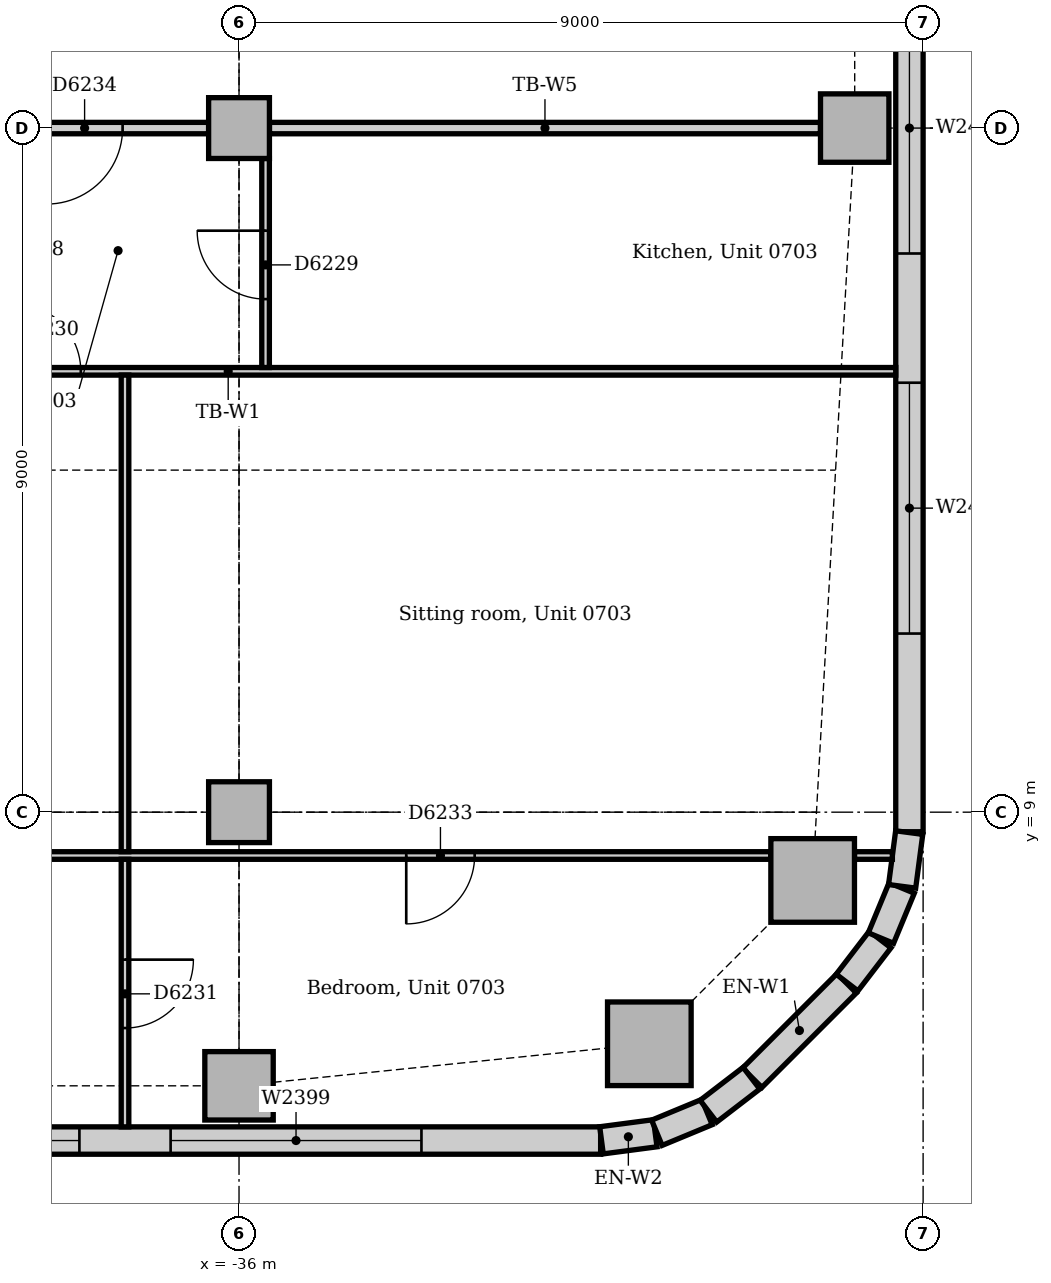
"""IFC4 building model, lengths in metres.
Left out: names, types, materials, properties, quantities, classifications, styles, units other than length and angle.
Written with IfcOpenShell. Run it as: python <this file> out.ifc"""

import sys

from ifc_helpers import new_model, si_unit, direction, frame, frame_2d, origin, origin_2d, place, context, subcontext, project, spatial, rectangle, extrude, element, fill, save


model = new_model("IFC4")
c1 = context("Model", 3, precision=1e-05, world=origin(), true_north=direction((0.0, 1.0)))
c2 = subcontext(c1, "Body", "Model", "MODEL_VIEW")
j1 = project(units=[si_unit("LENGTHUNIT", "METRE"), si_unit("PLANEANGLEUNIT", "RADIAN")], contexts=[c1])
p1 = place(None, origin())
s1 = spatial("IfcSite", under=j1, at=p1, CompositionType="ELEMENT")
p2 = place(p1, origin())
s2 = spatial("IfcBuilding", under=s1, at=p2, CompositionType="ELEMENT")
p3 = place(p2, frame((0.0, 0.0, 34.0)))
s3 = spatial("IfcBuildingStorey", under=s2, at=p3, CompositionType="ELEMENT", Elevation=34.0)
for number, where, z_axis, x_axis in (
    (1, (-30.602, 5.953, 0.0), (0.0, 0.0, 1.0), (1.0, 0.0, 0.0)),
    (2, (-28.453, 8.102, 0.0), (0.0, 0.0, 1.0), (1.0, 0.0, 0.0)),
):
    element("IfcColumn", number, at=place(p3, frame(where, z_axis=z_axis, x_axis=x_axis)), inside=s3, PredefinedType="COLUMN", context=c2, shape_type="SweptSolid", body=[
        extrude(rectangle(XDim=1.1, YDim=1.1, at=origin_2d()), origin(), (0.0, 0.0, 1.0), 3.85),
    ])
for number, where, z_axis, x_axis in (
    (3, (-36.0, 5.4, 0.0), (0.0, 0.0, 1.0), (1.0, 0.0, 0.0)),
    (4, (-27.9, 18.0, 0.0), (0.0, 0.0, 1.0), (1.0, 0.0, 0.0)),
):
    element("IfcColumn", number, at=place(p3, frame(where, z_axis=z_axis, x_axis=x_axis)), inside=s3, PredefinedType="COLUMN", context=c2, shape_type="SweptSolid", body=[
        extrude(rectangle(XDim=0.9, YDim=0.9, at=origin_2d()), origin(), (0.0, 0.0, 1.0), 3.85),
    ])
for number, where, z_axis, x_axis in (
    (5, (-36.0, 9.0, 0.0), (0.0, 0.0, 1.0), (1.0, 0.0, 0.0)),
    (6, (-36.0, 18.0, 0.0), (0.0, 0.0, 1.0), (1.0, 0.0, 0.0)),
):
    element("IfcColumn", number, at=place(p3, frame(where, z_axis=z_axis, x_axis=x_axis)), inside=s3, PredefinedType="COLUMN", context=c2, shape_type="SweptSolid", body=[
        extrude(rectangle(XDim=0.8, YDim=0.8, at=origin_2d()), origin(), (0.0, 0.0, 1.0), 3.85),
    ])
p4 = place(p3, frame((-61.757, 4.68, 0.0), z_axis=(0.0, 0.0, 1.0), x_axis=(1.0, 0.0, 0.0)))
e7 = element("IfcWall", 7, at=p4, inside=s3, PredefinedType="STANDARD", context=c2, shape_type="SweptSolid", body=[
    extrude(rectangle(XDim=30.515, YDim=0.36, at=frame_2d((15.257, 0.0))), origin(), (0.0, 0.0, 1.0), 3.85),
])
p5 = place(p4, frame((2.357, 0.0, 0.9)))
e8 = element("IfcOpeningElement", 8, at=p5, cuts=e7, PredefinedType="OPENING", context=c2, shape_type="SweptSolid", body=[
    extrude(rectangle(XDim=3.3, YDim=1.6, at=frame_2d((1.65, 0.8))), frame((0.0, 0.19, 0.0), z_axis=(0.0, -1.0, 0.0), x_axis=(1.0, 0.0, 0.0)), (0.0, 0.0, 1.0), 0.38),
])
p6 = place(p4, frame((6.857, 0.0, 0.9)))
e9 = element("IfcOpeningElement", 9, at=p6, cuts=e7, PredefinedType="OPENING", context=c2, shape_type="SweptSolid", body=[
    extrude(rectangle(XDim=3.3, YDim=1.6, at=frame_2d((1.65, 0.8))), frame((0.0, 0.19, 0.0), z_axis=(0.0, -1.0, 0.0), x_axis=(1.0, 0.0, 0.0)), (0.0, 0.0, 1.0), 0.38),
])
p7 = place(p4, frame((11.357, 0.0, 0.9)))
e10 = element("IfcOpeningElement", 10, at=p7, cuts=e7, PredefinedType="OPENING", context=c2, shape_type="SweptSolid", body=[
    extrude(rectangle(XDim=3.3, YDim=1.6, at=frame_2d((1.65, 0.8))), frame((0.0, 0.19, 0.0), z_axis=(0.0, -1.0, 0.0), x_axis=(1.0, 0.0, 0.0)), (0.0, 0.0, 1.0), 0.38),
])
p8 = place(p4, frame((15.857, 0.0, 0.9)))
e11 = element("IfcOpeningElement", 11, at=p8, cuts=e7, PredefinedType="OPENING", context=c2, shape_type="SweptSolid", body=[
    extrude(rectangle(XDim=3.3, YDim=1.6, at=frame_2d((1.65, 0.8))), frame((0.0, 0.19, 0.0), z_axis=(0.0, -1.0, 0.0), x_axis=(1.0, 0.0, 0.0)), (0.0, 0.0, 1.0), 0.38),
])
p9 = place(p4, frame((20.357, 0.0, 0.9)))
e12 = element("IfcOpeningElement", 12, at=p9, cuts=e7, PredefinedType="OPENING", context=c2, shape_type="SweptSolid", body=[
    extrude(rectangle(XDim=3.3, YDim=1.6, at=frame_2d((1.65, 0.8))), frame((0.0, 0.19, 0.0), z_axis=(0.0, -1.0, 0.0), x_axis=(1.0, 0.0, 0.0)), (0.0, 0.0, 1.0), 0.38),
])
p10 = place(p4, frame((24.857, 0.0, 0.9)))
e13 = element("IfcOpeningElement", 13, at=p10, cuts=e7, PredefinedType="OPENING", context=c2, shape_type="SweptSolid", body=[
    extrude(rectangle(XDim=3.3, YDim=1.6, at=frame_2d((1.65, 0.8))), frame((0.0, 0.19, 0.0), z_axis=(0.0, -1.0, 0.0), x_axis=(1.0, 0.0, 0.0)), (0.0, 0.0, 1.0), 0.38),
])
p11 = place(p3, frame((-29.249, 5.506, 0.0), z_axis=(0.0, 0.0, 1.0), x_axis=(0.707106781187, 0.707106781187, 0.0)))
e14 = element("IfcWall", 14, at=p11, inside=s3, PredefinedType="STANDARD", context=c2, shape_type="SweptSolid", body=[
    extrude(rectangle(XDim=1.757, YDim=0.36, at=frame_2d((0.879, 0.0))), origin(), (0.0, 0.0, 1.0), 3.85),
])
p12 = place(p3, frame((-27.18, 8.743, 0.0), z_axis=(0.0, 0.0, 1.0), x_axis=(0.0, 1.0, 0.0)))
e15 = element("IfcWall", 15, at=p12, inside=s3, PredefinedType="STANDARD", context=c2, shape_type="SweptSolid", body=[
    extrude(rectangle(XDim=12.257, YDim=0.36, at=frame_2d((6.129, 0.0))), origin(), (0.0, 0.0, 1.0), 3.85),
])
p13 = place(p12, frame((2.607, 0.0, 0.9)))
e16 = element("IfcOpeningElement", 16, at=p13, cuts=e15, PredefinedType="OPENING", context=c2, shape_type="SweptSolid", body=[
    extrude(rectangle(XDim=3.3, YDim=1.6, at=frame_2d((1.65, 0.8))), frame((0.0, 0.19, 0.0), z_axis=(0.0, -1.0, 0.0), x_axis=(1.0, 0.0, 0.0)), (0.0, 0.0, 1.0), 0.38),
])
p14 = place(p12, frame((7.607, 0.0, 0.9)))
e17 = element("IfcOpeningElement", 17, at=p14, cuts=e15, PredefinedType="OPENING", context=c2, shape_type="SweptSolid", body=[
    extrude(rectangle(XDim=3.3, YDim=1.6, at=frame_2d((1.65, 0.8))), frame((0.0, 0.19, 0.0), z_axis=(0.0, -1.0, 0.0), x_axis=(1.0, 0.0, 0.0)), (0.0, 0.0, 1.0), 0.38),
])
for number, where, z_axis, x_axis in (
    (18, (-31.231, 4.683, 0.0), (0.0, 0.0, 1.0), (0.991, 0.131, 0.0)),
    (19, (-30.503, 4.782, 0.0), (0.0, 0.0, 1.0), (0.924, 0.383, 0.0)),
):
    element("IfcWall", number, at=place(p3, frame(where, z_axis=z_axis, x_axis=x_axis)), inside=s3, PredefinedType="STANDARD", context=c2, shape_type="SweptSolid", body=[
        extrude(rectangle(XDim=0.713, YDim=0.36, at=frame_2d((0.356, 0.0))), origin(), (0.0, 0.0, 1.0), 3.85),
    ])
for number, where, z_axis, x_axis in (
    (20, (-29.825, 5.066, 0.0), (0.0, 0.0, 1.0), (0.793, 0.609, 0.0)),
    (21, (-28.0, 6.759, 0.0), (0.0, 0.0, 1.0), (0.609, 0.793, 0.0)),
):
    element("IfcWall", number, at=place(p3, frame(where, z_axis=z_axis, x_axis=x_axis)), inside=s3, PredefinedType="STANDARD", context=c2, shape_type="SweptSolid", body=[
        extrude(rectangle(XDim=0.713, YDim=0.36, at=frame_2d((0.357, 0.0))), origin(), (0.0, 0.0, 1.0), 3.85),
    ])
for number, where, z_axis, x_axis in (
    (22, (-27.555, 7.344, 0.0), (0.0, 0.0, 1.0), (0.383, 0.924, 0.0)),
    (23, (-27.276, 8.024, 0.0), (0.0, 0.0, 1.0), (0.131, 0.991, 0.0)),
):
    element("IfcWall", number, at=place(p3, frame(where, z_axis=z_axis, x_axis=x_axis)), inside=s3, PredefinedType="STANDARD", context=c2, shape_type="SweptSolid", body=[
        extrude(rectangle(XDim=0.713, YDim=0.36, at=frame_2d((0.356, 0.0))), origin(), (0.0, 0.0, 1.0), 3.85),
    ])
p15 = place(p3, frame((-35.6, 18.0, 0.0), z_axis=(0.0, 0.0, 1.0), x_axis=(1.0, 0.0, 0.0)))
e24 = element("IfcWall", 24, at=p15, inside=s3, PredefinedType="PARTITIONING", context=c2, shape_type="SweptSolid", body=[
    extrude(rectangle(XDim=7.25, YDim=0.15, at=frame_2d((3.625, 0.0))), origin(), (0.0, 0.0, 1.0), 3.15),
])
p16 = place(p3, frame((-44.6, 18.0, 0.0), z_axis=(0.0, 0.0, 1.0), x_axis=(1.0, 0.0, 0.0)))
e25 = element("IfcWall", 25, at=p16, inside=s3, PredefinedType="PARTITIONING", context=c2, shape_type="SweptSolid", body=[
    extrude(rectangle(XDim=8.2, YDim=0.15, at=frame_2d((4.1, 0.0))), origin(), (0.0, 0.0, 1.0), 3.15),
])
p17 = place(p16, frame((6.068, 0.0, 0.0)))
e26 = element("IfcOpeningElement", 26, at=p17, cuts=e25, PredefinedType="OPENING", context=c2, shape_type="SweptSolid", body=[
    extrude(rectangle(XDim=1.0, YDim=2.1, at=frame_2d((0.5, 1.05))), frame((0.0, 0.085, 0.0), z_axis=(0.0, -1.0, 0.0), x_axis=(1.0, 0.0, 0.0)), (0.0, 0.0, 1.0), 0.17),
])
p18 = place(p3, frame((-44.925, 14.8, 0.0), z_axis=(0.0, 0.0, 1.0), x_axis=(1.0, 0.0, 0.0)))
e27 = element("IfcWall", 27, at=p18, inside=s3, PredefinedType="PARTITIONING", context=c2, shape_type="SweptSolid", body=[
    extrude(rectangle(XDim=17.565, YDim=0.1, at=frame_2d((8.783, 0.0))), origin(), (0.0, 0.0, 1.0), 3.85),
])
p19 = place(p18, frame((5.943, 0.0, 0.0)))
e28 = element("IfcOpeningElement", 28, at=p19, cuts=e27, PredefinedType="OPENING", context=c2, shape_type="SweptSolid", body=[
    extrude(rectangle(XDim=0.9, YDim=2.1, at=frame_2d((0.45, 1.05))), frame((0.0, 0.06, 0.0), z_axis=(0.0, -1.0, 0.0), x_axis=(1.0, 0.0, 0.0)), (0.0, 0.0, 1.0), 0.12),
])
p20 = place(p3, frame((-44.925, 8.43, 0.0), z_axis=(0.0, 0.0, 1.0), x_axis=(1.0, 0.0, 0.0)))
e29 = element("IfcWall", 29, at=p20, inside=s3, PredefinedType="PARTITIONING", context=c2, shape_type="SweptSolid", body=[
    extrude(rectangle(XDim=15.922, YDim=0.1, at=frame_2d((7.961, 0.0))), origin(), (0.0, 0.0, 1.0), 3.85),
])
p21 = place(p20, frame((3.35, 0.0, 0.0)))
e30 = element("IfcOpeningElement", 30, at=p21, cuts=e29, PredefinedType="OPENING", context=c2, shape_type="SweptSolid", body=[
    extrude(rectangle(XDim=0.9, YDim=2.1, at=frame_2d((0.45, 1.05))), frame((0.0, 0.06, 0.0), z_axis=(0.0, -1.0, 0.0), x_axis=(1.0, 0.0, 0.0)), (0.0, 0.0, 1.0), 0.12),
])
p22 = place(p20, frame((11.125, 0.0, 0.0)))
e31 = element("IfcOpeningElement", 31, at=p22, cuts=e29, PredefinedType="OPENING", context=c2, shape_type="SweptSolid", body=[
    extrude(rectangle(XDim=0.9, YDim=2.1, at=frame_2d((0.45, 1.05))), frame((0.0, 0.06, 0.0), z_axis=(0.0, -1.0, 0.0), x_axis=(1.0, 0.0, 0.0)), (0.0, 0.0, 1.0), 0.12),
])
p23 = place(p3, frame((-27.903, 8.43, 0.0), z_axis=(0.0, 0.0, 1.0), x_axis=(1.0, 0.0, 0.0)))
e32 = element("IfcWall", 32, at=p23, inside=s3, PredefinedType="PARTITIONING", context=c2, shape_type="SweptSolid", body=[
    extrude(rectangle(XDim=0.499, YDim=0.1, at=frame_2d((0.249, 0.0))), origin(), (0.0, 0.0, 1.0), 3.85),
])
p24 = place(p3, frame((-37.5, 8.48, 0.0), z_axis=(0.0, 0.0, 1.0), x_axis=(0.0, 1.0, 0.0)))
e33 = element("IfcWall", 33, at=p24, inside=s3, PredefinedType="PARTITIONING", context=c2, shape_type="SweptSolid", body=[
    extrude(rectangle(XDim=6.27, YDim=0.1, at=frame_2d((3.135, 0.0))), origin(), (0.0, 0.0, 1.0), 3.85),
])
p25 = place(p3, frame((-37.5, 4.86, 0.0), z_axis=(0.0, 0.0, 1.0), x_axis=(0.0, 1.0, 0.0)))
e34 = element("IfcWall", 34, at=p25, inside=s3, PredefinedType="PARTITIONING", context=c2, shape_type="SweptSolid", body=[
    extrude(rectangle(XDim=3.52, YDim=0.1, at=frame_2d((1.76, 0.0))), origin(), (0.0, 0.0, 1.0), 3.85),
])
p26 = place(p25, frame((1.3, 0.0, 0.0)))
e35 = element("IfcOpeningElement", 35, at=p26, cuts=e34, PredefinedType="OPENING", context=c2, shape_type="SweptSolid", body=[
    extrude(rectangle(XDim=0.9, YDim=2.1, at=frame_2d((0.45, 1.05))), frame((0.0, 0.06, 0.0), z_axis=(0.0, -1.0, 0.0), x_axis=(1.0, 0.0, 0.0)), (0.0, 0.0, 1.0), 0.12),
])
p27 = place(p3, frame((-35.651, 14.85, 0.0), z_axis=(0.0, 0.0, 1.0), x_axis=(0.0, 1.0, 0.0)))
e36 = element("IfcWall", 36, at=p27, inside=s3, PredefinedType="PARTITIONING", context=c2, shape_type="SweptSolid", body=[
    extrude(rectangle(XDim=2.75, YDim=0.1, at=frame_2d((1.375, 0.0))), origin(), (0.0, 0.0, 1.0), 3.85),
])
p28 = place(p27, frame((0.9, 0.0, 0.0)))
e37 = element("IfcOpeningElement", 37, at=p28, cuts=e36, PredefinedType="OPENING", context=c2, shape_type="SweptSolid", body=[
    extrude(rectangle(XDim=0.9, YDim=2.1, at=frame_2d((0.45, 1.05))), frame((0.0, 0.06, 0.0), z_axis=(0.0, -1.0, 0.0), x_axis=(1.0, 0.0, 0.0)), (0.0, 0.0, 1.0), 0.12),
])
p29 = place(p9, origin())
e38 = element("IfcWindow", 38, at=p29, inside=s3, PartitioningType="SINGLE_PANEL", PredefinedType="WINDOW", context=c2, shape_type="SweptSolid", body=[
    extrude(rectangle(XDim=3.3, YDim=1.6, at=frame_2d((1.65, 0.8))), frame((0.0, 0.13, 0.0), z_axis=(0.0, -1.0, 0.0), x_axis=(1.0, 0.0, 0.0)), (0.0, 0.0, 1.0), 0.06),
])
fill(e12, e38)
p30 = place(p10, origin())
e39 = element("IfcWindow", 39, at=p30, inside=s3, PartitioningType="SINGLE_PANEL", PredefinedType="WINDOW", context=c2, shape_type="SweptSolid", body=[
    extrude(rectangle(XDim=3.3, YDim=1.6, at=frame_2d((1.65, 0.8))), frame((0.0, 0.13, 0.0), z_axis=(0.0, -1.0, 0.0), x_axis=(1.0, 0.0, 0.0)), (0.0, 0.0, 1.0), 0.06),
])
fill(e13, e39)
p31 = place(p13, origin())
e40 = element("IfcWindow", 40, at=p31, inside=s3, PartitioningType="SINGLE_PANEL", PredefinedType="WINDOW", context=c2, shape_type="SweptSolid", body=[
    extrude(rectangle(XDim=3.3, YDim=1.6, at=frame_2d((1.65, 0.8))), frame((0.0, 0.13, 0.0), z_axis=(0.0, -1.0, 0.0), x_axis=(1.0, 0.0, 0.0)), (0.0, 0.0, 1.0), 0.06),
])
fill(e16, e40)
p32 = place(p14, origin())
e41 = element("IfcWindow", 41, at=p32, inside=s3, PartitioningType="SINGLE_PANEL", PredefinedType="WINDOW", context=c2, shape_type="SweptSolid", body=[
    extrude(rectangle(XDim=3.3, YDim=1.6, at=frame_2d((1.65, 0.8))), frame((0.0, 0.13, 0.0), z_axis=(0.0, -1.0, 0.0), x_axis=(1.0, 0.0, 0.0)), (0.0, 0.0, 1.0), 0.06),
])
fill(e17, e41)
p33 = place(p28, origin())
e42 = element("IfcDoor", 42, at=p33, inside=s3, OperationType="SINGLE_SWING_RIGHT", PredefinedType="DOOR", context=c2, shape_type="SweptSolid", body=[
    extrude(rectangle(XDim=0.9, YDim=2.1, at=frame_2d((0.45, 1.05))), frame((0.0, 0.025, 0.0), z_axis=(0.0, -1.0, 0.0), x_axis=(1.0, 0.0, 0.0)), (0.0, 0.0, 1.0), 0.05),
])
fill(e37, e42)
p34 = place(p19, origin())
e43 = element("IfcDoor", 43, at=p34, inside=s3, OperationType="SINGLE_SWING_LEFT", PredefinedType="DOOR", context=c2, shape_type="SweptSolid", body=[
    extrude(rectangle(XDim=0.9, YDim=2.1, at=frame_2d((0.45, 1.05))), frame((0.0, 0.025, 0.0), z_axis=(0.0, -1.0, 0.0), x_axis=(1.0, 0.0, 0.0)), (0.0, 0.0, 1.0), 0.05),
])
fill(e28, e43)
p35 = place(p26, frame((0.9, 0.0, 0.0), z_axis=(0.0, 0.0, 1.0), x_axis=(-1.0, 0.0, 0.0)))
e44 = element("IfcDoor", 44, at=p35, inside=s3, OperationType="SINGLE_SWING_LEFT", PredefinedType="DOOR", context=c2, shape_type="SweptSolid", body=[
    extrude(rectangle(XDim=0.9, YDim=2.1, at=frame_2d((0.45, 1.05))), frame((0.0, 0.025, 0.0), z_axis=(0.0, -1.0, 0.0), x_axis=(1.0, 0.0, 0.0)), (0.0, 0.0, 1.0), 0.05),
])
fill(e35, e44)
p36 = place(p22, frame((0.9, 0.0, 0.0), z_axis=(0.0, 0.0, 1.0), x_axis=(-1.0, 0.0, 0.0)))
e45 = element("IfcDoor", 45, at=p36, inside=s3, OperationType="SINGLE_SWING_RIGHT", PredefinedType="DOOR", context=c2, shape_type="SweptSolid", body=[
    extrude(rectangle(XDim=0.9, YDim=2.1, at=frame_2d((0.45, 1.05))), frame((0.0, 0.025, 0.0), z_axis=(0.0, -1.0, 0.0), x_axis=(1.0, 0.0, 0.0)), (0.0, 0.0, 1.0), 0.05),
])
fill(e31, e45)
p37 = place(p17, frame((1.0, 0.0, 0.0), z_axis=(0.0, 0.0, 1.0), x_axis=(-1.0, 0.0, 0.0)))
e46 = element("IfcDoor", 46, at=p37, inside=s3, OperationType="SINGLE_SWING_RIGHT", PredefinedType="DOOR", context=c2, shape_type="SweptSolid", body=[
    extrude(rectangle(XDim=1.0, YDim=2.1, at=frame_2d((0.5, 1.05))), frame((0.0, 0.025, 0.0), z_axis=(0.0, -1.0, 0.0), x_axis=(1.0, 0.0, 0.0)), (0.0, 0.0, 1.0), 0.05),
])
fill(e26, e46)
save(model, sys.argv[1])
